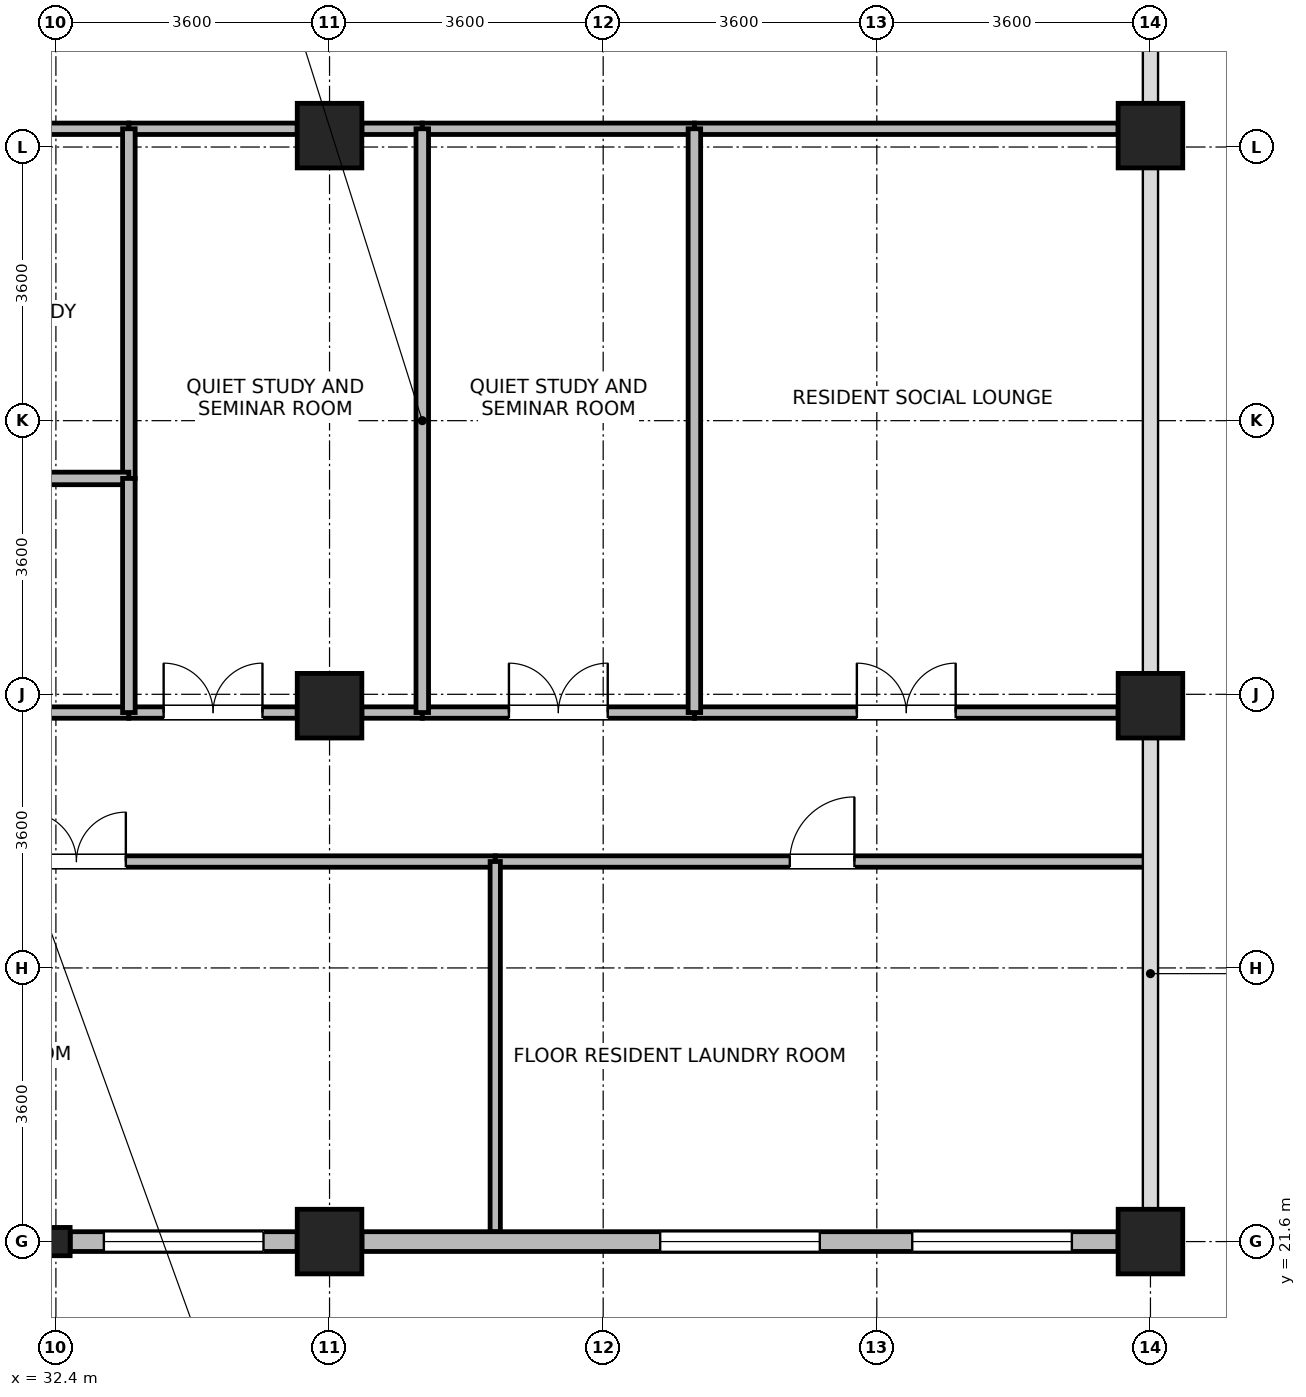
"""IFC4 building model, lengths in metres.
Left out: names, types, materials, properties, quantities, classifications, styles, units other than length and angle.
Written with IfcOpenShell. Run it as: python <this file> out.ifc"""

import sys

from ifc_helpers import new_model, si_unit, direction, frame, frame_2d, origin, origin_2d, place, context, subcontext, project, spatial, rectangle, i_section, extrude, source, transform, mapped, element, fill, save


model = new_model("IFC4")
c1 = context("Model", 3, precision=1e-05, world=origin(), true_north=direction((0.0, 1.0)))
c2 = subcontext(c1, "Body", "Model", "MODEL_VIEW")
j1 = project(units=[si_unit("LENGTHUNIT", "METRE"), si_unit("PLANEANGLEUNIT", "RADIAN")], contexts=[c1])
p1 = place(None, origin())
s1 = spatial("IfcSite", under=j1, at=p1, CompositionType="ELEMENT")
p2 = place(p1, origin())
s2 = spatial("IfcBuilding", under=s1, at=p2, CompositionType="ELEMENT")
p3 = place(p2, frame((0.0, 0.0, 268.4)))
s3 = spatial("IfcBuildingStorey", under=s2, at=p3, CompositionType="ELEMENT", Elevation=268.4)
m1 = source(origin(), c2, "Body", "SweptSolid", [
    extrude(rectangle(XDim=0.85, YDim=0.85, at=origin_2d()), origin(), (0.0, 0.0, 1.0), 3.7),
])
for number, where, z_axis, x_axis in (
    (1, (36.0, 21.6, 0.0), (0.0, 0.0, 1.0), (1.0, 0.0, 0.0)),
    (2, (36.0, 28.65, 0.0), (0.0, 0.0, 1.0), (1.0, 0.0, 0.0)),
    (3, (36.0, 36.15, 0.0), (0.0, 0.0, 1.0), (1.0, 0.0, 0.0)),
    (4, (46.8, 21.6, 0.0), (0.0, 0.0, 1.0), (1.0, 0.0, 0.0)),
    (5, (46.8, 28.65, 0.0), (0.0, 0.0, 1.0), (1.0, 0.0, 0.0)),
    (6, (46.8, 36.15, 0.0), (0.0, 0.0, 1.0), (1.0, 0.0, 0.0)),
):
    element("IfcColumn", number, at=place(p3, frame(where, z_axis=z_axis, x_axis=x_axis)), inside=s3, PredefinedType="COLUMN", context=c2, shape_type="MappedRepresentation", body=[
        mapped(m1, transform((0.0, 0.0, 0.0), x_axis=(1.0, 0.0, 0.0), y_axis=(0.0, 1.0, 0.0), z_axis=(0.0, 0.0, 1.0), scale=1.0)),
    ])
m2 = source(origin(), c2, "Body", "SweptSolid", [
    extrude(i_section(OverallWidth=0.374, OverallDepth=0.372, WebThickness=0.015, FlangeThickness=0.026, FilletRadius=0.015, at=origin_2d()), origin(), (0.0, 0.0, 1.0), 3.7),
])
p4 = place(p3, frame((32.4, 21.6, 0.0), z_axis=(0.0, 0.0, 1.0), x_axis=(1.0, 0.0, 0.0)))
e7 = element("IfcColumn", 7, at=p4, inside=s3, PredefinedType="COLUMN", context=c2, shape_type="MappedRepresentation", body=[
    mapped(m2, transform((0.0, 0.0, 0.0), x_axis=(1.0, 0.0, 0.0), y_axis=(0.0, 1.0, 0.0), z_axis=(0.0, 0.0, 1.0), scale=1.0)),
])
p5 = place(p3, frame((35.574, 21.6, 0.0), z_axis=(0.0, 0.0, 1.0), x_axis=(-1.0, 0.0, 0.0)))
e8 = element("IfcWall", 8, at=p5, inside=s3, PredefinedType="STANDARD", context=c2, shape_type="SweptSolid", body=[
    extrude(rectangle(XDim=2.986, YDim=0.26, at=frame_2d((1.493, 0.0))), origin(), (0.0, 0.0, 1.0), 3.055),
])
p6 = place(p5, frame((0.443, 0.0, 0.85)))
e9 = element("IfcOpeningElement", 9, at=p6, cuts=e8, PredefinedType="OPENING", context=c2, shape_type="SweptSolid", body=[
    extrude(rectangle(XDim=2.1, YDim=1.95, at=frame_2d((1.05, 0.975))), frame((0.0, 0.14, 0.0), z_axis=(0.0, -1.0, 0.0), x_axis=(1.0, 0.0, 0.0)), (0.0, 0.0, 1.0), 0.28),
])
p7 = place(p3, frame((46.374, 21.6, 0.0), z_axis=(0.0, 0.0, 1.0), x_axis=(-1.0, 0.0, 0.0)))
e10 = element("IfcWall", 10, at=p7, inside=s3, PredefinedType="STANDARD", context=c2, shape_type="SweptSolid", body=[
    extrude(rectangle(XDim=9.948, YDim=0.26, at=frame_2d((4.974, 0.0))), origin(), (0.0, 0.0, 1.0), 3.055),
])
p8 = place(p7, frame((0.608, 0.0, 0.85)))
e11 = element("IfcOpeningElement", 11, at=p8, cuts=e10, PredefinedType="OPENING", context=c2, shape_type="SweptSolid", body=[
    extrude(rectangle(XDim=2.1, YDim=1.95, at=frame_2d((1.05, 0.975))), frame((0.0, 0.14, 0.0), z_axis=(0.0, -1.0, 0.0), x_axis=(1.0, 0.0, 0.0)), (0.0, 0.0, 1.0), 0.28),
])
p9 = place(p7, frame((3.924, 0.0, 0.85)))
e12 = element("IfcOpeningElement", 12, at=p9, cuts=e10, PredefinedType="OPENING", context=c2, shape_type="SweptSolid", body=[
    extrude(rectangle(XDim=2.1, YDim=1.95, at=frame_2d((1.05, 0.975))), frame((0.0, 0.14, 0.0), z_axis=(0.0, -1.0, 0.0), x_axis=(1.0, 0.0, 0.0)), (0.0, 0.0, 1.0), 0.28),
])
p10 = place(p3, frame((27.16, 26.6, 0.0), z_axis=(0.0, 0.0, 1.0), x_axis=(1.0, 0.0, 0.0)))
e13 = element("IfcWall", 13, at=p10, inside=s3, PredefinedType="PARTITIONING", context=c2, shape_type="SweptSolid", body=[
    extrude(rectangle(XDim=11.02, YDim=0.15, at=frame_2d((5.51, 0.0))), origin(), (0.0, 0.0, 1.0), 3.455),
])
p11 = place(p10, frame((4.86, 0.0, 0.0)))
e14 = element("IfcOpeningElement", 14, at=p11, cuts=e13, PredefinedType="OPENING", context=c2, shape_type="SweptSolid", body=[
    extrude(rectangle(XDim=1.3, YDim=2.12, at=frame_2d((0.65, 1.06))), frame((0.0, 0.085, 0.0), z_axis=(0.0, -1.0, 0.0), x_axis=(1.0, 0.0, 0.0)), (0.0, 0.0, 1.0), 0.17),
])
p12 = place(p3, frame((38.18, 26.6, 0.0), z_axis=(0.0, 0.0, 1.0), x_axis=(1.0, 0.0, 0.0)))
e15 = element("IfcWall", 15, at=p12, inside=s3, PredefinedType="PARTITIONING", context=c2, shape_type="SweptSolid", body=[
    extrude(rectangle(XDim=8.6, YDim=0.15, at=frame_2d((4.3, 0.0))), origin(), (0.0, 0.0, 1.0), 3.455),
])
p13 = place(p12, frame((3.875, 0.0, 0.0)))
e16 = element("IfcOpeningElement", 16, at=p13, cuts=e15, PredefinedType="OPENING", context=c2, shape_type="SweptSolid", body=[
    extrude(rectangle(XDim=0.85, YDim=2.04, at=frame_2d((0.425, 1.02))), frame((0.0, 0.085, 0.0), z_axis=(0.0, -1.0, 0.0), x_axis=(1.0, 0.0, 0.0)), (0.0, 0.0, 1.0), 0.17),
])
p14 = place(p3, frame((40.8, 28.56, 0.0), z_axis=(0.0, 0.0, 1.0), x_axis=(1.0, 0.0, 0.0)))
e17 = element("IfcWall", 17, at=p14, inside=s3, PredefinedType="PARTITIONING", context=c2, shape_type="SweptSolid", body=[
    extrude(rectangle(XDim=5.575, YDim=0.15, at=frame_2d((2.788, 0.0))), origin(), (0.0, 0.0, 1.0), 2.905),
])
p15 = place(p14, frame((2.137, 0.0, 0.0)))
e18 = element("IfcOpeningElement", 18, at=p15, cuts=e17, PredefinedType="OPENING", context=c2, shape_type="SweptSolid", body=[
    extrude(rectangle(XDim=1.3, YDim=2.12, at=frame_2d((0.65, 1.06))), frame((0.0, 0.085, 0.0), z_axis=(0.0, -1.0, 0.0), x_axis=(1.0, 0.0, 0.0)), (0.0, 0.0, 1.0), 0.17),
])
p16 = place(p3, frame((40.8, 36.24, 0.0), z_axis=(0.0, 0.0, 1.0), x_axis=(1.0, 0.0, 0.0)))
e19 = element("IfcWall", 19, at=p16, inside=s3, PredefinedType="PARTITIONING", context=c2, shape_type="SweptSolid", body=[
    extrude(rectangle(XDim=5.575, YDim=0.15, at=frame_2d((2.788, 0.0))), origin(), (0.0, 0.0, 1.0), 2.905),
])
p17 = place(p3, frame((29.225, 28.56, 0.0), z_axis=(0.0, 0.0, 1.0), x_axis=(1.0, 0.0, 0.0)))
e20 = element("IfcWall", 20, at=p17, inside=s3, PredefinedType="PARTITIONING", context=c2, shape_type="SweptSolid", body=[
    extrude(rectangle(XDim=4.135, YDim=0.15, at=frame_2d((2.067, 0.0))), origin(), (0.0, 0.0, 1.0), 2.905),
])
p18 = place(p17, frame((1.637, 0.0, 0.0)))
e21 = element("IfcOpeningElement", 21, at=p18, cuts=e20, PredefinedType="OPENING", context=c2, shape_type="SweptSolid", body=[
    extrude(rectangle(XDim=0.86, YDim=2.02, at=frame_2d((0.43, 1.01))), frame((0.0, 0.085, 0.0), z_axis=(0.0, -1.0, 0.0), x_axis=(1.0, 0.0, 0.0)), (0.0, 0.0, 1.0), 0.17),
])
p19 = place(p3, frame((29.225, 36.24, 0.0), z_axis=(0.0, 0.0, 1.0), x_axis=(1.0, 0.0, 0.0)))
e22 = element("IfcWall", 22, at=p19, inside=s3, PredefinedType="PARTITIONING", context=c2, shape_type="SweptSolid", body=[
    extrude(rectangle(XDim=4.135, YDim=0.15, at=frame_2d((2.067, 0.0))), origin(), (0.0, 0.0, 1.0), 2.905),
])
p20 = place(p19, frame((1.417, 0.0, 0.0)))
e23 = element("IfcOpeningElement", 23, at=p20, cuts=e22, PredefinedType="OPENING", context=c2, shape_type="SweptSolid", body=[
    extrude(rectangle(XDim=1.3, YDim=2.12, at=frame_2d((0.65, 1.06))), frame((0.0, 0.085, 0.0), z_axis=(0.0, -1.0, 0.0), x_axis=(1.0, 0.0, 0.0)), (0.0, 0.0, 1.0), 0.17),
])
p21 = place(p3, frame((33.36, 28.56, 0.0), z_axis=(0.0, 0.0, 1.0), x_axis=(1.0, 0.0, 0.0)))
e24 = element("IfcWall", 24, at=p21, inside=s3, PredefinedType="PARTITIONING", context=c2, shape_type="SweptSolid", body=[
    extrude(rectangle(XDim=2.215, YDim=0.15, at=frame_2d((1.107, 0.0))), origin(), (0.0, 0.0, 1.0), 2.905),
])
p22 = place(p21, frame((0.458, 0.0, 0.0)))
e25 = element("IfcOpeningElement", 25, at=p22, cuts=e24, PredefinedType="OPENING", context=c2, shape_type="SweptSolid", body=[
    extrude(rectangle(XDim=1.3, YDim=2.12, at=frame_2d((0.65, 1.06))), frame((0.0, 0.085, 0.0), z_axis=(0.0, -1.0, 0.0), x_axis=(1.0, 0.0, 0.0)), (0.0, 0.0, 1.0), 0.17),
])
p23 = place(p3, frame((36.425, 28.56, 0.0), z_axis=(0.0, 0.0, 1.0), x_axis=(1.0, 0.0, 0.0)))
e26 = element("IfcWall", 26, at=p23, inside=s3, PredefinedType="PARTITIONING", context=c2, shape_type="SweptSolid", body=[
    extrude(rectangle(XDim=0.795, YDim=0.15, at=frame_2d((0.397, 0.0))), origin(), (0.0, 0.0, 1.0), 2.905),
])
p24 = place(p3, frame((33.36, 36.24, 0.0), z_axis=(0.0, 0.0, 1.0), x_axis=(1.0, 0.0, 0.0)))
e27 = element("IfcWall", 27, at=p24, inside=s3, PredefinedType="PARTITIONING", context=c2, shape_type="SweptSolid", body=[
    extrude(rectangle(XDim=2.215, YDim=0.15, at=frame_2d((1.107, 0.0))), origin(), (0.0, 0.0, 1.0), 2.905),
])
p25 = place(p3, frame((36.425, 36.24, 0.0), z_axis=(0.0, 0.0, 1.0), x_axis=(1.0, 0.0, 0.0)))
e28 = element("IfcWall", 28, at=p25, inside=s3, PredefinedType="PARTITIONING", context=c2, shape_type="SweptSolid", body=[
    extrude(rectangle(XDim=0.795, YDim=0.15, at=frame_2d((0.397, 0.0))), origin(), (0.0, 0.0, 1.0), 2.905),
])
p26 = place(p3, frame((37.22, 28.56, 0.0), z_axis=(0.0, 0.0, 1.0), x_axis=(1.0, 0.0, 0.0)))
e29 = element("IfcWall", 29, at=p26, inside=s3, PredefinedType="PARTITIONING", context=c2, shape_type="SweptSolid", body=[
    extrude(rectangle(XDim=3.58, YDim=0.15, at=frame_2d((1.79, 0.0))), origin(), (0.0, 0.0, 1.0), 2.905),
])
p27 = place(p26, frame((1.14, 0.0, 0.0)))
e30 = element("IfcOpeningElement", 30, at=p27, cuts=e29, PredefinedType="OPENING", context=c2, shape_type="SweptSolid", body=[
    extrude(rectangle(XDim=1.3, YDim=2.12, at=frame_2d((0.65, 1.06))), frame((0.0, 0.085, 0.0), z_axis=(0.0, -1.0, 0.0), x_axis=(1.0, 0.0, 0.0)), (0.0, 0.0, 1.0), 0.17),
])
p28 = place(p3, frame((37.22, 36.24, 0.0), z_axis=(0.0, 0.0, 1.0), x_axis=(1.0, 0.0, 0.0)))
e31 = element("IfcWall", 31, at=p28, inside=s3, PredefinedType="PARTITIONING", context=c2, shape_type="SweptSolid", body=[
    extrude(rectangle(XDim=3.58, YDim=0.15, at=frame_2d((1.79, 0.0))), origin(), (0.0, 0.0, 1.0), 2.905),
])
for number, where, z_axis, x_axis in (
    (32, (37.22, 28.56, 0.0), (0.0, 0.0, 1.0), (0.0, 1.0, 0.0)),
    (33, (40.8, 28.56, 0.0), (0.0, 0.0, 1.0), (0.0, 1.0, 0.0)),
):
    element("IfcWall", number, at=place(p3, frame(where, z_axis=z_axis, x_axis=x_axis)), inside=s3, PredefinedType="PARTITIONING", context=c2, shape_type="SweptSolid", body=[
        extrude(rectangle(XDim=7.68, YDim=0.165, at=frame_2d((3.84, 0.0))), origin(), (0.0, 0.0, 1.0), 3.455),
    ])
p29 = place(p3, frame((38.18, 21.732, 0.0), z_axis=(0.0, 0.0, 1.0), x_axis=(0.0, 1.0, 0.0)))
e34 = element("IfcWall", 34, at=p29, inside=s3, PredefinedType="PARTITIONING", context=c2, shape_type="SweptSolid", body=[
    extrude(rectangle(XDim=4.868, YDim=0.135, at=frame_2d((2.434, 0.0))), origin(), (0.0, 0.0, 1.0), 3.455),
])
p30 = place(p3, frame((33.36, 31.64, 0.0), z_axis=(0.0, 0.0, 1.0), x_axis=(0.0, 1.0, 0.0)))
e35 = element("IfcWall", 35, at=p30, inside=s3, PredefinedType="PARTITIONING", context=c2, shape_type="SweptSolid", body=[
    extrude(rectangle(XDim=4.6, YDim=0.165, at=frame_2d((2.3, 0.0))), origin(), (0.0, 0.0, 1.0), 3.455),
])
p31 = place(p3, frame((28.84, 31.64, 0.0), z_axis=(0.0, 0.0, 1.0), x_axis=(1.0, 0.0, 0.0)))
e36 = element("IfcWall", 36, at=p31, inside=s3, PredefinedType="PARTITIONING", context=c2, shape_type="SweptSolid", body=[
    extrude(rectangle(XDim=4.52, YDim=0.165, at=frame_2d((2.26, 0.0))), origin(), (0.0, 0.0, 1.0), 3.455),
])
p32 = place(p3, frame((33.36, 28.56, 0.0), z_axis=(0.0, 0.0, 1.0), x_axis=(0.0, 1.0, 0.0)))
e37 = element("IfcWall", 37, at=p32, inside=s3, PredefinedType="PARTITIONING", context=c2, shape_type="SweptSolid", body=[
    extrude(rectangle(XDim=3.08, YDim=0.165, at=frame_2d((1.54, 0.0))), origin(), (0.0, 0.0, 1.0), 3.455),
])
p33 = place(p6, origin())
e38 = element("IfcWindow", 38, at=p33, inside=s3, PartitioningType="SINGLE_PANEL", PredefinedType="WINDOW", context=c2, shape_type="SweptSolid", body=[
    extrude(rectangle(XDim=2.1, YDim=1.95, at=frame_2d((1.05, 0.975))), frame((0.0, 0.03, 0.0), z_axis=(0.0, -1.0, 0.0), x_axis=(1.0, 0.0, 0.0)), (0.0, 0.0, 1.0), 0.06),
])
fill(e9, e38)
p34 = place(p8, origin())
e39 = element("IfcWindow", 39, at=p34, inside=s3, PartitioningType="SINGLE_PANEL", PredefinedType="WINDOW", context=c2, shape_type="SweptSolid", body=[
    extrude(rectangle(XDim=2.1, YDim=1.95, at=frame_2d((1.05, 0.975))), frame((0.0, 0.03, 0.0), z_axis=(0.0, -1.0, 0.0), x_axis=(1.0, 0.0, 0.0)), (0.0, 0.0, 1.0), 0.06),
])
fill(e11, e39)
p35 = place(p9, origin())
e40 = element("IfcWindow", 40, at=p35, inside=s3, PartitioningType="SINGLE_PANEL", PredefinedType="WINDOW", context=c2, shape_type="SweptSolid", body=[
    extrude(rectangle(XDim=2.1, YDim=1.95, at=frame_2d((1.05, 0.975))), frame((0.0, 0.03, 0.0), z_axis=(0.0, -1.0, 0.0), x_axis=(1.0, 0.0, 0.0)), (0.0, 0.0, 1.0), 0.06),
])
fill(e12, e40)
p36 = place(p11, origin())
e41 = element("IfcDoor", 41, at=p36, inside=s3, OperationType="DOUBLE_DOOR_SINGLE_SWING", PredefinedType="DOOR", context=c2, shape_type="SweptSolid", body=[
    extrude(rectangle(XDim=1.3, YDim=2.12, at=frame_2d((0.65, 1.06))), frame((0.0, 0.025, 0.0), z_axis=(0.0, -1.0, 0.0), x_axis=(1.0, 0.0, 0.0)), (0.0, 0.0, 1.0), 0.05),
])
fill(e14, e41)
p37 = place(p13, origin())
e42 = element("IfcDoor", 42, at=p37, inside=s3, OperationType="SINGLE_SWING_RIGHT", PredefinedType="DOOR", context=c2, shape_type="SweptSolid", body=[
    extrude(rectangle(XDim=0.85, YDim=2.04, at=frame_2d((0.425, 1.02))), frame((0.0, 0.025, 0.0), z_axis=(0.0, -1.0, 0.0), x_axis=(1.0, 0.0, 0.0)), (0.0, 0.0, 1.0), 0.05),
])
fill(e16, e42)
p38 = place(p15, origin())
e43 = element("IfcDoor", 43, at=p38, inside=s3, OperationType="DOUBLE_DOOR_SINGLE_SWING", PredefinedType="DOOR", context=c2, shape_type="SweptSolid", body=[
    extrude(rectangle(XDim=1.3, YDim=2.12, at=frame_2d((0.65, 1.06))), frame((0.0, 0.025, 0.0), z_axis=(0.0, -1.0, 0.0), x_axis=(1.0, 0.0, 0.0)), (0.0, 0.0, 1.0), 0.05),
])
fill(e18, e43)
p39 = place(p22, origin())
e44 = element("IfcDoor", 44, at=p39, inside=s3, OperationType="DOUBLE_DOOR_SINGLE_SWING", PredefinedType="DOOR", context=c2, shape_type="SweptSolid", body=[
    extrude(rectangle(XDim=1.3, YDim=2.12, at=frame_2d((0.65, 1.06))), frame((0.0, 0.025, 0.0), z_axis=(0.0, -1.0, 0.0), x_axis=(1.0, 0.0, 0.0)), (0.0, 0.0, 1.0), 0.05),
])
fill(e25, e44)
p40 = place(p27, origin())
e45 = element("IfcDoor", 45, at=p40, inside=s3, OperationType="DOUBLE_DOOR_SINGLE_SWING", PredefinedType="DOOR", context=c2, shape_type="SweptSolid", body=[
    extrude(rectangle(XDim=1.3, YDim=2.12, at=frame_2d((0.65, 1.06))), frame((0.0, 0.025, 0.0), z_axis=(0.0, -1.0, 0.0), x_axis=(1.0, 0.0, 0.0)), (0.0, 0.0, 1.0), 0.05),
])
fill(e30, e45)
save(model, sys.argv[1])
